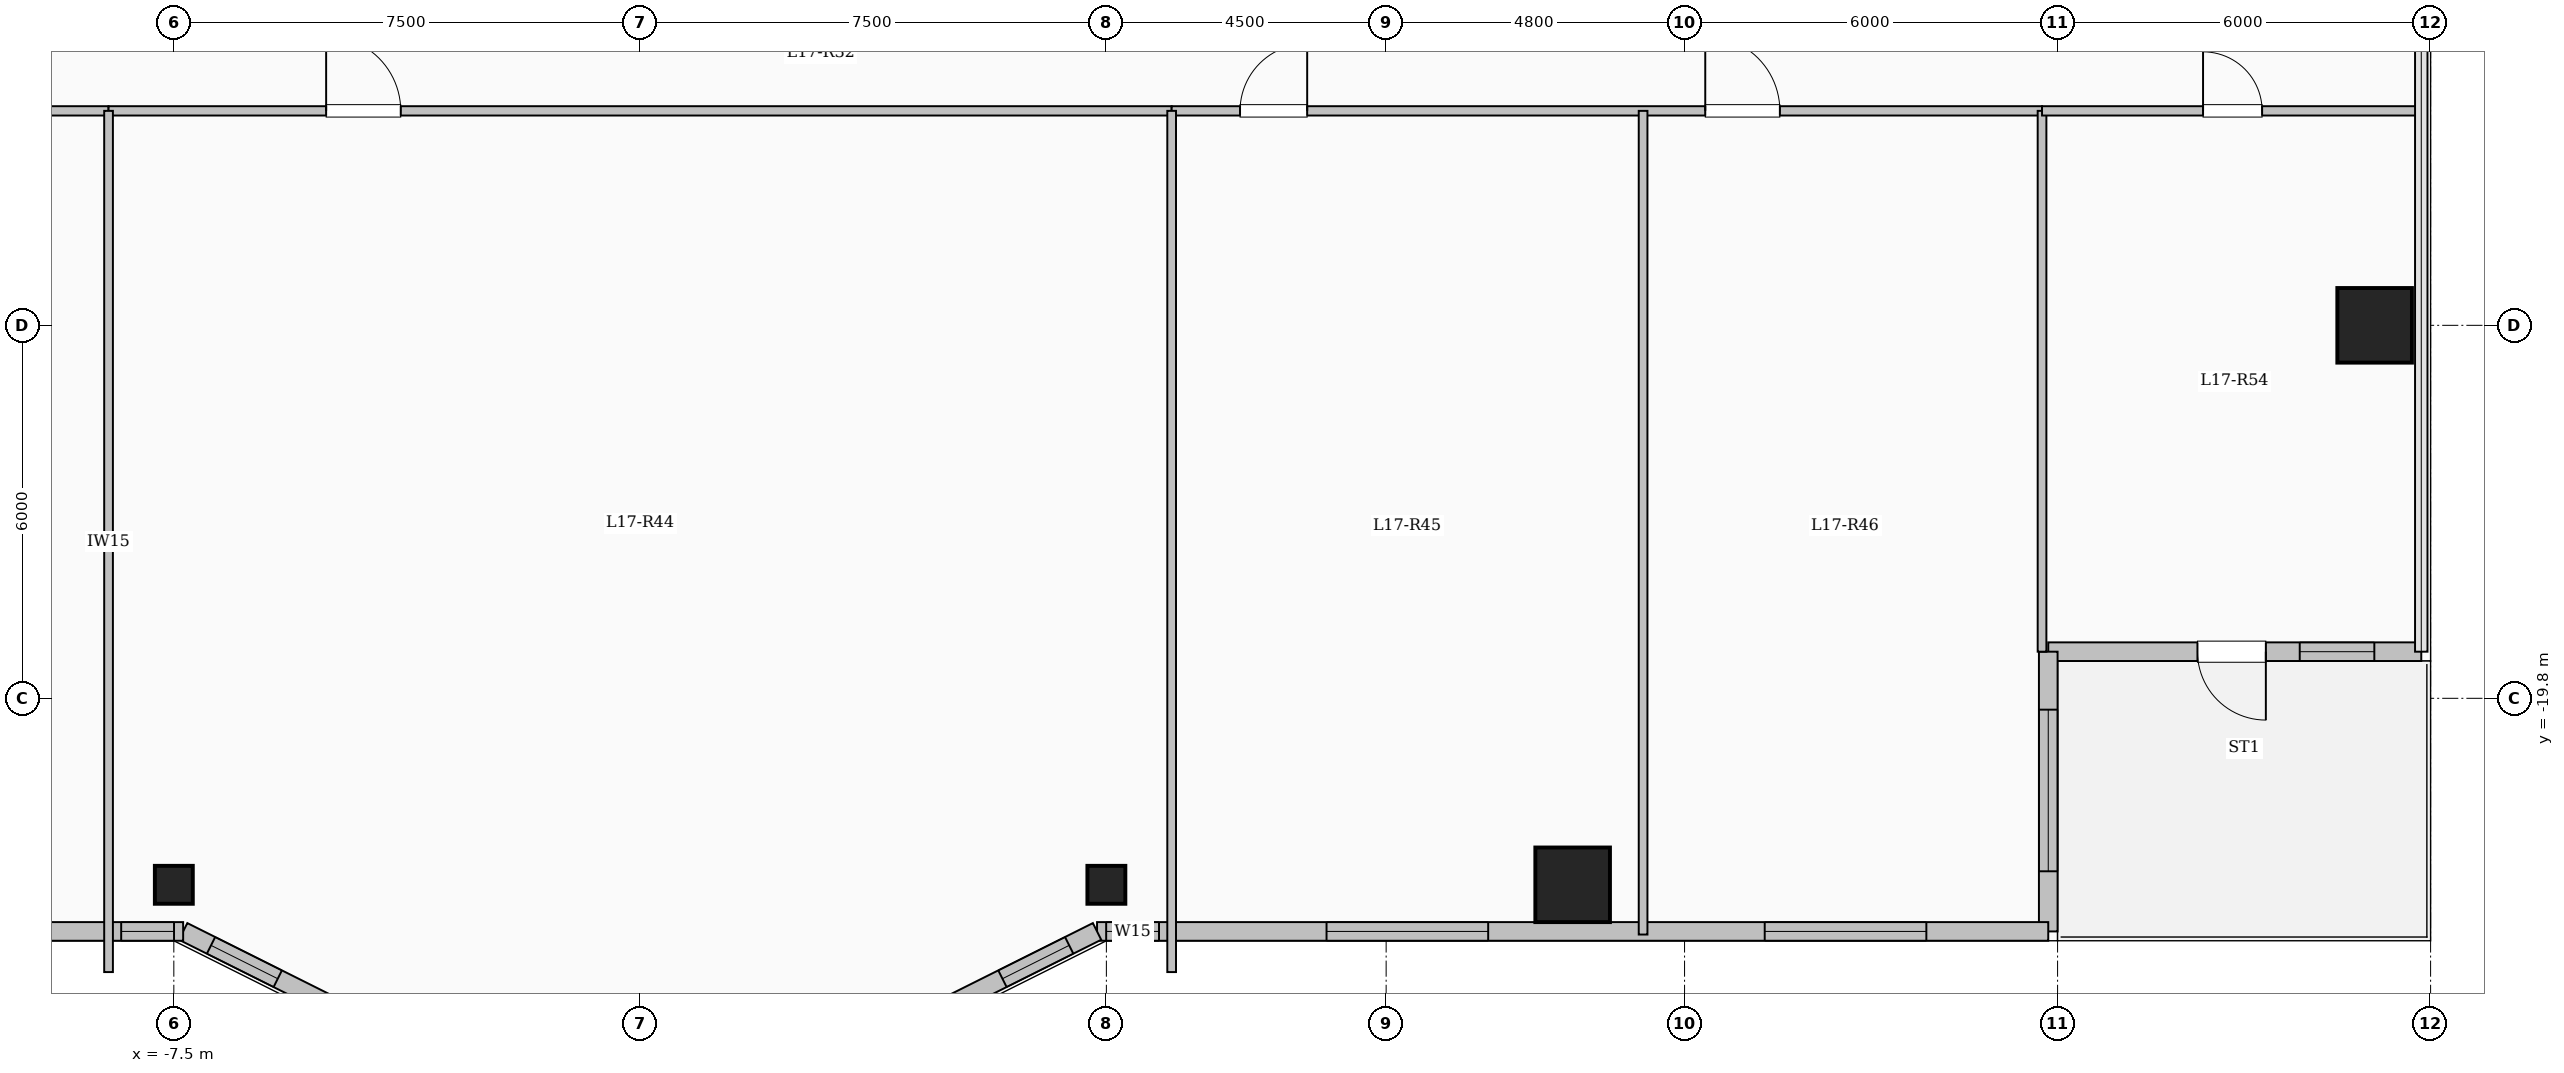
"""IFC4 building model, lengths in metres.
Left out: names, types, materials, properties, quantities, classifications, styles, units other than length and angle.
Written with IfcOpenShell. Run it as: python <this file> out.ifc"""

import sys

from ifc_helpers import new_model, si_unit, direction, frame, frame_2d, origin, origin_2d, place, context, subcontext, project, spatial, rectangle, hollow_circle, extrude, element, fill, save


model = new_model("IFC4")
c1 = context("Model", 3, precision=1e-05, world=origin(), true_north=direction((0.0, 1.0)))
c2 = subcontext(c1, "Body", "Model", "MODEL_VIEW")
j1 = project(units=[si_unit("LENGTHUNIT", "METRE"), si_unit("PLANEANGLEUNIT", "RADIAN")], contexts=[c1])
p1 = place(None, origin())
s1 = spatial("IfcSite", under=j1, at=p1, CompositionType="ELEMENT")
p2 = place(p1, origin())
s2 = spatial("IfcBuilding", under=s1, at=p2, CompositionType="ELEMENT")
p3 = place(p2, frame((0.0, 0.0, 64.2)))
s3 = spatial("IfcBuildingStorey", under=s2, at=p3, CompositionType="ELEMENT", Elevation=64.2)
for number, where, z_axis, x_axis in (
    (1, (-7.5, -22.8, 0.0), (0.0, 0.0, 1.0), (1.0, 0.0, 0.0)),
    (2, (7.5, -22.8, 0.0), (0.0, 0.0, 1.0), (1.0, 0.0, 0.0)),
):
    element("IfcColumn", number, at=place(p3, frame(where, z_axis=z_axis, x_axis=x_axis)), inside=s3, PredefinedType="COLUMN", context=c2, shape_type="SweptSolid", body=[
        extrude(hollow_circle(Radius=0.305, WallThickness=0.025, at=origin_2d()), origin(), (0.0, 0.0, 1.0), 4.5),
    ])
for number, where, z_axis, x_axis in (
    (3, (15.0, -22.8, 0.0), (0.0, 0.0, 1.0), (1.0, 0.0, 0.0)),
    (4, (27.9, -13.8, 0.0), (0.0, 0.0, 1.0), (1.0, 0.0, 0.0)),
):
    element("IfcColumn", number, at=place(p3, frame(where, z_axis=z_axis, x_axis=x_axis)), inside=s3, PredefinedType="COLUMN", context=c2, shape_type="SweptSolid", body=[
        extrude(rectangle(XDim=1.2, YDim=1.2, at=origin_2d()), origin(), (0.0, 0.0, 1.0), 4.5),
    ])
p4 = place(p3, frame((28.65, -19.05, 0.0), z_axis=(0.0, 0.0, 1.0), x_axis=(-1.0, 0.0, 0.0)))
e5 = element("IfcWall", 5, at=p4, inside=s3, PredefinedType="SOLIDWALL", context=c2, shape_type="SweptSolid", body=[
    extrude(rectangle(XDim=6.0, YDim=0.3, at=frame_2d((3.0, 0.0))), origin(), (0.0, 0.0, 1.0), 4.2),
])
p5 = place(p4, frame((2.5, 0.0, 0.0)))
e6 = element("IfcOpeningElement", 6, at=p5, cuts=e5, PredefinedType="OPENING", context=c2, shape_type="SweptSolid", body=[
    extrude(rectangle(XDim=1.1, YDim=2.2, at=frame_2d((0.55, 1.1))), frame((0.0, 0.16, 0.0), z_axis=(0.0, -1.0, 0.0), x_axis=(1.0, 0.0, 0.0)), (0.0, 0.0, 1.0), 0.32),
])
p6 = place(p4, frame((0.755, 0.0, 0.95)))
e7 = element("IfcOpeningElement", 7, at=p6, cuts=e5, PredefinedType="OPENING", context=c2, shape_type="SweptSolid", body=[
    extrude(rectangle(XDim=1.2, YDim=1.5, at=frame_2d((0.6, 0.75))), frame((0.0, 0.16, 0.0), z_axis=(0.0, -1.0, 0.0), x_axis=(1.0, 0.0, 0.0)), (0.0, 0.0, 1.0), 0.32),
])
p7 = place(p3, frame((22.65, -19.05, 0.0), z_axis=(0.0, 0.0, 1.0), x_axis=(0.0, -1.0, 0.0)))
e8 = element("IfcWall", 8, at=p7, inside=s3, PredefinedType="SOLIDWALL", context=c2, shape_type="SweptSolid", body=[
    extrude(rectangle(XDim=4.5, YDim=0.3, at=frame_2d((2.25, 0.0))), origin(), (0.0, 0.0, 1.0), 4.2),
])
p8 = place(p7, frame((0.933, 0.0, 0.85)))
e9 = element("IfcOpeningElement", 9, at=p8, cuts=e8, PredefinedType="OPENING", context=c2, shape_type="SweptSolid", body=[
    extrude(rectangle(XDim=2.6, YDim=2.4, at=frame_2d((1.3, 1.2))), frame((0.0, 0.16, 0.0), z_axis=(0.0, -1.0, 0.0), x_axis=(1.0, 0.0, 0.0)), (0.0, 0.0, 1.0), 0.32),
])
p9 = place(p3, frame((22.65, -23.55, 0.0), z_axis=(0.0, 0.0, 1.0), x_axis=(-1.0, 0.0, 0.0)))
e10 = element("IfcWall", 10, at=p9, inside=s3, PredefinedType="SOLIDWALL", context=c2, shape_type="SweptSolid", body=[
    extrude(rectangle(XDim=15.3, YDim=0.3, at=frame_2d((7.65, 0.0))), origin(), (0.0, 0.0, 1.0), 4.2),
])
p10 = place(p9, frame((1.961, 0.0, 0.85)))
e11 = element("IfcOpeningElement", 11, at=p10, cuts=e10, PredefinedType="OPENING", context=c2, shape_type="SweptSolid", body=[
    extrude(rectangle(XDim=2.6, YDim=2.4, at=frame_2d((1.3, 1.2))), frame((0.0, 0.16, 0.0), z_axis=(0.0, -1.0, 0.0), x_axis=(1.0, 0.0, 0.0)), (0.0, 0.0, 1.0), 0.32),
])
p11 = place(p9, frame((9.009, 0.0, 0.85)))
e12 = element("IfcOpeningElement", 12, at=p11, cuts=e10, PredefinedType="OPENING", context=c2, shape_type="SweptSolid", body=[
    extrude(rectangle(XDim=2.6, YDim=2.4, at=frame_2d((1.3, 1.2))), frame((0.0, 0.16, 0.0), z_axis=(0.0, -1.0, 0.0), x_axis=(1.0, 0.0, 0.0)), (0.0, 0.0, 1.0), 0.32),
])
p12 = place(p9, frame((14.303, 0.0, 0.95)))
e13 = element("IfcOpeningElement", 13, at=p12, cuts=e10, PredefinedType="OPENING", context=c2, shape_type="SweptSolid", body=[
    extrude(rectangle(XDim=0.85, YDim=1.5, at=frame_2d((0.425, 0.75))), frame((0.0, 0.16, 0.0), z_axis=(0.0, -1.0, 0.0), x_axis=(1.0, 0.0, 0.0)), (0.0, 0.0, 1.0), 0.32),
])
p13 = place(p3, frame((7.35, -23.55, 0.0), z_axis=(0.0, 0.0, 1.0), x_axis=(-0.894427191, -0.4472135955, 0.0)))
e14 = element("IfcWall", 14, at=p13, inside=s3, PredefinedType="SOLIDWALL", context=c2, shape_type="SweptSolid", body=[
    extrude(rectangle(XDim=3.354, YDim=0.3, at=frame_2d((1.677, 0.0))), origin(), (0.0, 0.0, 1.0), 4.2),
])
p14 = place(p13, frame((0.501, 0.0, 0.95)))
e15 = element("IfcOpeningElement", 15, at=p14, cuts=e14, PredefinedType="OPENING", context=c2, shape_type="SweptSolid", body=[
    extrude(rectangle(XDim=1.2, YDim=1.5, at=frame_2d((0.6, 0.75))), frame((0.0, 0.16, 0.0), z_axis=(0.0, -1.0, 0.0), x_axis=(1.0, 0.0, 0.0)), (0.0, 0.0, 1.0), 0.32),
])
p15 = place(p3, frame((-4.35, -25.05, 0.0), z_axis=(0.0, 0.0, 1.0), x_axis=(-0.894427191, 0.4472135955, 0.0)))
e16 = element("IfcWall", 16, at=p15, inside=s3, PredefinedType="SOLIDWALL", context=c2, shape_type="SweptSolid", body=[
    extrude(rectangle(XDim=3.354, YDim=0.3, at=frame_2d((1.677, 0.0))), origin(), (0.0, 0.0, 1.0), 4.2),
])
p16 = place(p15, frame((1.653, 0.0, 0.95)))
e17 = element("IfcOpeningElement", 17, at=p16, cuts=e16, PredefinedType="OPENING", context=c2, shape_type="SweptSolid", body=[
    extrude(rectangle(XDim=1.2, YDim=1.5, at=frame_2d((0.6, 0.75))), frame((0.0, 0.16, 0.0), z_axis=(0.0, -1.0, 0.0), x_axis=(1.0, 0.0, 0.0)), (0.0, 0.0, 1.0), 0.32),
])
p17 = place(p3, frame((-7.35, -23.55, 0.0), z_axis=(0.0, 0.0, 1.0), x_axis=(-1.0, 0.0, 0.0)))
e18 = element("IfcWall", 18, at=p17, inside=s3, PredefinedType="SOLIDWALL", context=c2, shape_type="SweptSolid", body=[
    extrude(rectangle(XDim=15.3, YDim=0.3, at=frame_2d((7.65, 0.0))), origin(), (0.0, 0.0, 1.0), 4.2),
])
p18 = place(p17, frame((0.147, 0.0, 0.95)))
e19 = element("IfcOpeningElement", 19, at=p18, cuts=e18, PredefinedType="OPENING", context=c2, shape_type="SweptSolid", body=[
    extrude(rectangle(XDim=0.85, YDim=1.5, at=frame_2d((0.425, 0.75))), frame((0.0, 0.16, 0.0), z_axis=(0.0, -1.0, 0.0), x_axis=(1.0, 0.0, 0.0)), (0.0, 0.0, 1.0), 0.32),
])
p19 = place(p17, frame((3.566, 0.0, 0.85)))
e20 = element("IfcOpeningElement", 20, at=p19, cuts=e18, PredefinedType="OPENING", context=c2, shape_type="SweptSolid", body=[
    extrude(rectangle(XDim=2.6, YDim=2.4, at=frame_2d((1.3, 1.2))), frame((0.0, 0.16, 0.0), z_axis=(0.0, -1.0, 0.0), x_axis=(1.0, 0.0, 0.0)), (0.0, 0.0, 1.0), 0.32),
])
p20 = place(p17, frame((10.589, 0.0, 0.85)))
e21 = element("IfcOpeningElement", 21, at=p20, cuts=e18, PredefinedType="OPENING", context=c2, shape_type="SweptSolid", body=[
    extrude(rectangle(XDim=2.6, YDim=2.4, at=frame_2d((1.3, 1.2))), frame((0.0, 0.16, 0.0), z_axis=(0.0, -1.0, 0.0), x_axis=(1.0, 0.0, 0.0)), (0.0, 0.0, 1.0), 0.32),
])
p21 = place(p3, frame((-22.55, -10.35, 0.0), z_axis=(0.0, 0.0, 1.0), x_axis=(1.0, 0.0, 0.0)))
e22 = element("IfcWall", 22, at=p21, inside=s3, PredefinedType="PARTITIONING", context=c2, shape_type="SweptSolid", body=[
    extrude(rectangle(XDim=14.0, YDim=0.15, at=frame_2d((7.0, 0.0))), origin(), (0.0, 0.0, 1.0), 4.2),
])
p22 = place(p21, frame((1.1, 0.0, 0.0)))
e23 = element("IfcOpeningElement", 23, at=p22, cuts=e22, PredefinedType="OPENING", context=c2, shape_type="SweptSolid", body=[
    extrude(rectangle(XDim=1.08, YDim=2.15, at=frame_2d((0.54, 1.075))), frame((0.0, 0.085, 0.0), z_axis=(0.0, -1.0, 0.0), x_axis=(1.0, 0.0, 0.0)), (0.0, 0.0, 1.0), 0.17),
])
p23 = place(p21, frame((7.596, 0.0, 0.0)))
e24 = element("IfcOpeningElement", 24, at=p23, cuts=e22, PredefinedType="OPENING", context=c2, shape_type="SweptSolid", body=[
    extrude(rectangle(XDim=1.08, YDim=2.15, at=frame_2d((0.54, 1.075))), frame((0.0, 0.085, 0.0), z_axis=(0.0, -1.0, 0.0), x_axis=(1.0, 0.0, 0.0)), (0.0, 0.0, 1.0), 0.17),
])
p24 = place(p3, frame((-8.55, -10.35, 0.0), z_axis=(0.0, 0.0, 1.0), x_axis=(1.0, 0.0, 0.0)))
e25 = element("IfcWall", 25, at=p24, inside=s3, PredefinedType="PARTITIONING", context=c2, shape_type="SweptSolid", body=[
    extrude(rectangle(XDim=17.1, YDim=0.15, at=frame_2d((8.55, 0.0))), origin(), (0.0, 0.0, 1.0), 4.2),
])
p25 = place(p24, frame((3.5, 0.0, 0.0)))
e26 = element("IfcOpeningElement", 26, at=p25, cuts=e25, PredefinedType="OPENING", context=c2, shape_type="SweptSolid", body=[
    extrude(rectangle(XDim=1.2, YDim=2.15, at=frame_2d((0.6, 1.075))), frame((0.0, 0.085, 0.0), z_axis=(0.0, -1.0, 0.0), x_axis=(1.0, 0.0, 0.0)), (0.0, 0.0, 1.0), 0.17),
])
p26 = place(p3, frame((8.55, -10.35, 0.0), z_axis=(0.0, 0.0, 1.0), x_axis=(1.0, 0.0, 0.0)))
e27 = element("IfcWall", 27, at=p26, inside=s3, PredefinedType="PARTITIONING", context=c2, shape_type="SweptSolid", body=[
    extrude(rectangle(XDim=14.0, YDim=0.15, at=frame_2d((7.0, 0.0))), origin(), (0.0, 0.0, 1.0), 4.2),
])
p27 = place(p26, frame((1.1, 0.0, 0.0)))
e28 = element("IfcOpeningElement", 28, at=p27, cuts=e27, PredefinedType="OPENING", context=c2, shape_type="SweptSolid", body=[
    extrude(rectangle(XDim=1.08, YDim=2.15, at=frame_2d((0.54, 1.075))), frame((0.0, 0.085, 0.0), z_axis=(0.0, -1.0, 0.0), x_axis=(1.0, 0.0, 0.0)), (0.0, 0.0, 1.0), 0.17),
])
p28 = place(p26, frame((8.583, 0.0, 0.0)))
e29 = element("IfcOpeningElement", 29, at=p28, cuts=e27, PredefinedType="OPENING", context=c2, shape_type="SweptSolid", body=[
    extrude(rectangle(XDim=1.2, YDim=2.15, at=frame_2d((0.6, 1.075))), frame((0.0, 0.085, 0.0), z_axis=(0.0, -1.0, 0.0), x_axis=(1.0, 0.0, 0.0)), (0.0, 0.0, 1.0), 0.17),
])
for number, where, z_axis, x_axis in (
    (30, (-8.55, -24.204, 0.0), (0.0, 0.0, 1.0), (0.0, 1.0, 0.0)),
    (31, (8.55, -24.204, 0.0), (0.0, 0.0, 1.0), (0.0, 1.0, 0.0)),
):
    element("IfcWall", number, at=place(p3, frame(where, z_axis=z_axis, x_axis=x_axis)), inside=s3, PredefinedType="PARTITIONING", context=c2, shape_type="SweptSolid", body=[
        extrude(rectangle(XDim=13.854, YDim=0.14, at=frame_2d((6.927, 0.0))), origin(), (0.0, 0.0, 1.0), 4.2),
    ])
p29 = place(p3, frame((16.133, -23.6, 0.0), z_axis=(0.0, 0.0, 1.0), x_axis=(0.0, 1.0, 0.0)))
e32 = element("IfcWall", 32, at=p29, inside=s3, PredefinedType="PARTITIONING", context=c2, shape_type="SweptSolid", body=[
    extrude(rectangle(XDim=13.25, YDim=0.14, at=frame_2d((6.625, 0.0))), origin(), (0.0, 0.0, 1.0), 4.2),
])
p30 = place(p3, frame((22.55, -19.05, 0.0), z_axis=(0.0, 0.0, 1.0), x_axis=(0.0, 1.0, 0.0)))
e33 = element("IfcWall", 33, at=p30, inside=s3, PredefinedType="PARTITIONING", context=c2, shape_type="SweptSolid", body=[
    extrude(rectangle(XDim=8.7, YDim=0.14, at=frame_2d((4.35, 0.0))), origin(), (0.0, 0.0, 1.0), 4.2),
])
p31 = place(p3, frame((22.55, -10.35, 0.0), z_axis=(0.0, 0.0, 1.0), x_axis=(1.0, 0.0, 0.0)))
e34 = element("IfcWall", 34, at=p31, inside=s3, PredefinedType="PARTITIONING", context=c2, shape_type="SweptSolid", body=[
    extrude(rectangle(XDim=6.13, YDim=0.15, at=frame_2d((3.065, 0.0))), origin(), (0.0, 0.0, 1.0), 4.2),
])
p32 = place(p31, frame((2.59, 0.0, 0.0)))
e35 = element("IfcOpeningElement", 35, at=p32, cuts=e34, PredefinedType="OPENING", context=c2, shape_type="SweptSolid", body=[
    extrude(rectangle(XDim=0.95, YDim=2.15, at=frame_2d((0.475, 1.075))), frame((0.0, 0.085, 0.0), z_axis=(0.0, -1.0, 0.0), x_axis=(1.0, 0.0, 0.0)), (0.0, 0.0, 1.0), 0.17),
])
p33 = place(p5, origin())
e36 = element("IfcDoor", 36, at=p33, inside=s3, OperationType="SINGLE_SWING_LEFT", PredefinedType="DOOR", context=c2, shape_type="SweptSolid", body=[
    extrude(rectangle(XDim=1.1, YDim=2.2, at=frame_2d((0.55, 1.1))), frame((0.0, 0.025, 0.0), z_axis=(0.0, -1.0, 0.0), x_axis=(1.0, 0.0, 0.0)), (0.0, 0.0, 1.0), 0.05),
])
fill(e6, e36)
p34 = place(p6, origin())
e37 = element("IfcWindow", 37, at=p34, inside=s3, PartitioningType="SINGLE_PANEL", PredefinedType="WINDOW", context=c2, shape_type="SweptSolid", body=[
    extrude(rectangle(XDim=1.2, YDim=1.5, at=frame_2d((0.6, 0.75))), frame((0.0, 0.03, 0.0), z_axis=(0.0, -1.0, 0.0), x_axis=(1.0, 0.0, 0.0)), (0.0, 0.0, 1.0), 0.06),
])
fill(e7, e37)
p35 = place(p8, origin())
e38 = element("IfcWindow", 38, at=p35, inside=s3, PartitioningType="SINGLE_PANEL", PredefinedType="WINDOW", context=c2, shape_type="SweptSolid", body=[
    extrude(rectangle(XDim=2.6, YDim=2.4, at=frame_2d((1.3, 1.2))), frame((0.0, 0.03, 0.0), z_axis=(0.0, -1.0, 0.0), x_axis=(1.0, 0.0, 0.0)), (0.0, 0.0, 1.0), 0.06),
])
fill(e9, e38)
p36 = place(p10, origin())
e39 = element("IfcWindow", 39, at=p36, inside=s3, PartitioningType="SINGLE_PANEL", PredefinedType="WINDOW", context=c2, shape_type="SweptSolid", body=[
    extrude(rectangle(XDim=2.6, YDim=2.4, at=frame_2d((1.3, 1.2))), frame((0.0, 0.03, 0.0), z_axis=(0.0, -1.0, 0.0), x_axis=(1.0, 0.0, 0.0)), (0.0, 0.0, 1.0), 0.06),
])
fill(e11, e39)
p37 = place(p11, origin())
e40 = element("IfcWindow", 40, at=p37, inside=s3, PartitioningType="SINGLE_PANEL", PredefinedType="WINDOW", context=c2, shape_type="SweptSolid", body=[
    extrude(rectangle(XDim=2.6, YDim=2.4, at=frame_2d((1.3, 1.2))), frame((0.0, 0.03, 0.0), z_axis=(0.0, -1.0, 0.0), x_axis=(1.0, 0.0, 0.0)), (0.0, 0.0, 1.0), 0.06),
])
fill(e12, e40)
p38 = place(p12, origin())
e41 = element("IfcWindow", 41, at=p38, inside=s3, PartitioningType="SINGLE_PANEL", PredefinedType="WINDOW", context=c2, shape_type="SweptSolid", body=[
    extrude(rectangle(XDim=0.85, YDim=1.5, at=frame_2d((0.425, 0.75))), frame((0.0, 0.03, 0.0), z_axis=(0.0, -1.0, 0.0), x_axis=(1.0, 0.0, 0.0)), (0.0, 0.0, 1.0), 0.06),
])
fill(e13, e41)
p39 = place(p14, origin())
e42 = element("IfcWindow", 42, at=p39, inside=s3, PartitioningType="SINGLE_PANEL", PredefinedType="WINDOW", context=c2, shape_type="SweptSolid", body=[
    extrude(rectangle(XDim=1.2, YDim=1.5, at=frame_2d((0.6, 0.75))), frame((0.0, 0.03, 0.0), z_axis=(0.0, -1.0, 0.0), x_axis=(1.0, 0.0, 0.0)), (0.0, 0.0, 1.0), 0.06),
])
fill(e15, e42)
p40 = place(p16, origin())
e43 = element("IfcWindow", 43, at=p40, inside=s3, PartitioningType="SINGLE_PANEL", PredefinedType="WINDOW", context=c2, shape_type="SweptSolid", body=[
    extrude(rectangle(XDim=1.2, YDim=1.5, at=frame_2d((0.6, 0.75))), frame((0.0, 0.03, 0.0), z_axis=(0.0, -1.0, 0.0), x_axis=(1.0, 0.0, 0.0)), (0.0, 0.0, 1.0), 0.06),
])
fill(e17, e43)
p41 = place(p18, origin())
e44 = element("IfcWindow", 44, at=p41, inside=s3, PartitioningType="SINGLE_PANEL", PredefinedType="WINDOW", context=c2, shape_type="SweptSolid", body=[
    extrude(rectangle(XDim=0.85, YDim=1.5, at=frame_2d((0.425, 0.75))), frame((0.0, 0.03, 0.0), z_axis=(0.0, -1.0, 0.0), x_axis=(1.0, 0.0, 0.0)), (0.0, 0.0, 1.0), 0.06),
])
fill(e19, e44)
p42 = place(p25, origin())
e45 = element("IfcDoor", 45, at=p42, inside=s3, OperationType="SINGLE_SWING_LEFT", PredefinedType="DOOR", context=c2, shape_type="SweptSolid", body=[
    extrude(rectangle(XDim=1.2, YDim=2.15, at=frame_2d((0.6, 1.075))), frame((0.0, 0.025, 0.0), z_axis=(0.0, -1.0, 0.0), x_axis=(1.0, 0.0, 0.0)), (0.0, 0.0, 1.0), 0.05),
])
fill(e26, e45)
p43 = place(p27, origin())
e46 = element("IfcDoor", 46, at=p43, inside=s3, OperationType="SINGLE_SWING_RIGHT", PredefinedType="DOOR", context=c2, shape_type="SweptSolid", body=[
    extrude(rectangle(XDim=1.08, YDim=2.15, at=frame_2d((0.54, 1.075))), frame((0.0, 0.025, 0.0), z_axis=(0.0, -1.0, 0.0), x_axis=(1.0, 0.0, 0.0)), (0.0, 0.0, 1.0), 0.05),
])
fill(e28, e46)
p44 = place(p28, origin())
e47 = element("IfcDoor", 47, at=p44, inside=s3, OperationType="SINGLE_SWING_LEFT", PredefinedType="DOOR", context=c2, shape_type="SweptSolid", body=[
    extrude(rectangle(XDim=1.2, YDim=2.15, at=frame_2d((0.6, 1.075))), frame((0.0, 0.025, 0.0), z_axis=(0.0, -1.0, 0.0), x_axis=(1.0, 0.0, 0.0)), (0.0, 0.0, 1.0), 0.05),
])
fill(e29, e47)
p45 = place(p32, origin())
e48 = element("IfcDoor", 48, at=p45, inside=s3, OperationType="SINGLE_SWING_LEFT", PredefinedType="DOOR", context=c2, shape_type="SweptSolid", body=[
    extrude(rectangle(XDim=0.95, YDim=2.15, at=frame_2d((0.475, 1.075))), frame((0.0, 0.025, 0.0), z_axis=(0.0, -1.0, 0.0), x_axis=(1.0, 0.0, 0.0)), (0.0, 0.0, 1.0), 0.05),
])
fill(e35, e48)
save(model, sys.argv[1])
